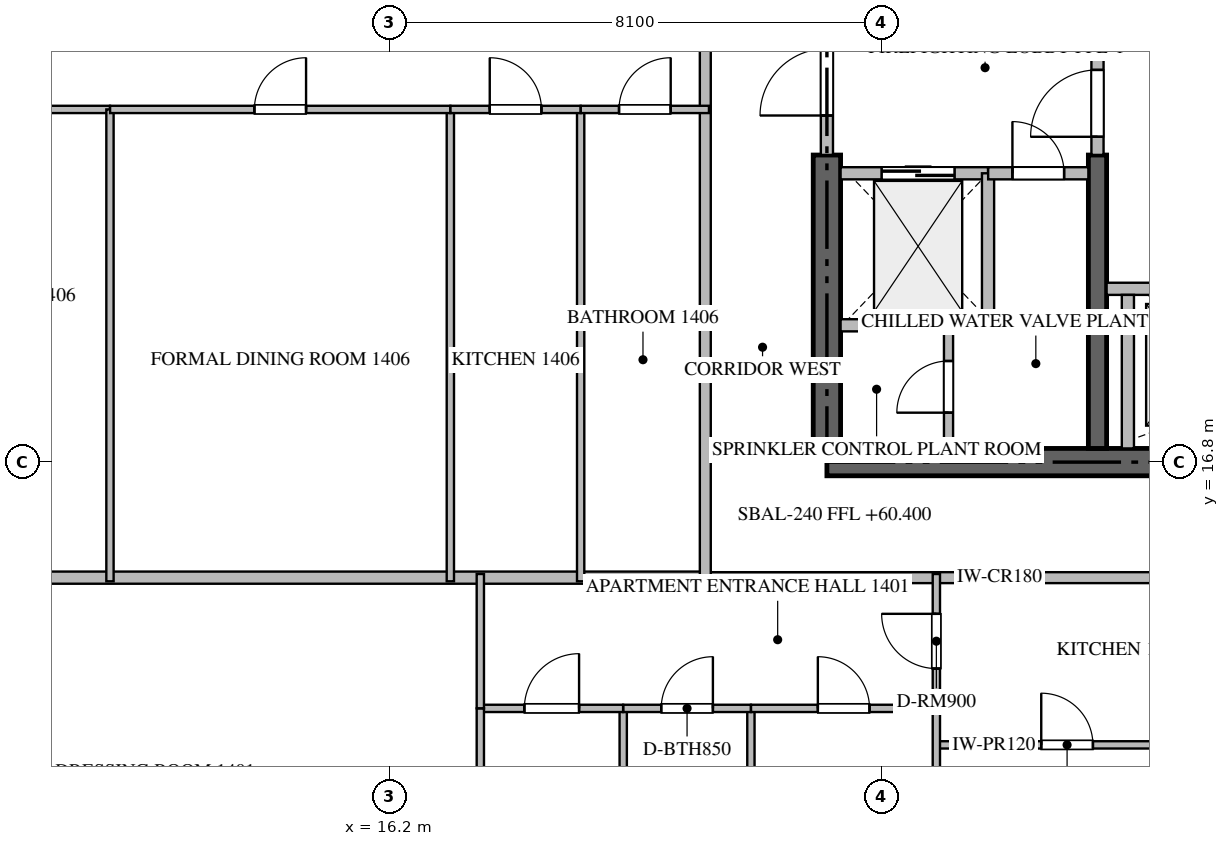
"""IFC4 building model, lengths in metres.
Left out: names, types, materials, properties, quantities, classifications, styles, units other than length and angle.
Written with IfcOpenShell. Run it as: python <this file> out.ifc"""

import sys

from ifc_helpers import new_model, si_unit, direction, frame, frame_2d, origin, place, context, subcontext, project, spatial, rectangle, extrude, source, transform, mapped, element, fill, save


model = new_model("IFC4")
c1 = context("Model", 3, precision=1e-05, world=origin(), true_north=direction((0.0, 1.0)))
c2 = subcontext(c1, "Body", "Model", "MODEL_VIEW")
j1 = project(units=[si_unit("LENGTHUNIT", "METRE"), si_unit("PLANEANGLEUNIT", "RADIAN")], contexts=[c1])
p1 = place(None, origin())
s1 = spatial("IfcSite", under=j1, at=p1, CompositionType="ELEMENT")
p2 = place(p1, origin())
s2 = spatial("IfcBuilding", under=s1, at=p2, CompositionType="ELEMENT")
p3 = place(p2, frame((0.0, 0.0, 60.45)))
s3 = spatial("IfcBuildingStorey", under=s2, at=p3, CompositionType="ELEMENT", Elevation=60.45)
p4 = place(p3, frame((23.4, 16.8, -0.26), z_axis=(0.0, 0.0, 1.0), x_axis=(1.0, 0.0, 0.0)))
e1 = element("IfcWall", 1, at=p4, inside=s3, PredefinedType="SHEAR", context=c2, shape_type="SweptSolid", body=[
    extrude(rectangle(XDim=18.0, YDim=0.45, at=frame_2d((9.0, 0.0))), origin(), (0.0, 0.0, 1.0), 3.748),
])
p5 = place(p3, frame((23.4, 17.025, -0.26), z_axis=(0.0, 0.0, 1.0), x_axis=(0.0, 1.0, 0.0)))
e2 = element("IfcWall", 2, at=p5, inside=s3, PredefinedType="SHEAR", context=c2, shape_type="SweptSolid", body=[
    extrude(rectangle(XDim=4.825, YDim=0.45, at=frame_2d((2.413, 0.0))), origin(), (0.0, 0.0, 1.0), 3.748),
])
p6 = place(p3, frame((27.85, 17.025, -0.26), z_axis=(0.0, 0.0, 1.0), x_axis=(0.0, 1.0, 0.0)))
e3 = element("IfcWall", 3, at=p6, inside=s3, PredefinedType="SHEAR", context=c2, shape_type="SweptSolid", body=[
    extrude(rectangle(XDim=4.825, YDim=0.3, at=frame_2d((2.413, 0.0))), origin(), (0.0, 0.0, 1.0), 3.748),
])
p7 = place(p3, frame((23.625, 21.55, 0.0), z_axis=(0.0, 0.0, 1.0), x_axis=(1.0, 0.0, 0.0)))
e4 = element("IfcWall", 4, at=p7, inside=s3, PredefinedType="STANDARD", context=c2, shape_type="SweptSolid", body=[
    extrude(rectangle(XDim=2.425, YDim=0.2, at=frame_2d((1.212, 0.0))), origin(), (0.0, 0.0, 1.0), 3.49),
])
p8 = place(p7, frame((0.675, 0.0, 0.0)))
e5 = element("IfcOpeningElement", 5, at=p8, cuts=e4, PredefinedType="OPENING", context=c2, shape_type="SweptSolid", body=[
    extrude(rectangle(XDim=1.2, YDim=2.2, at=frame_2d((0.6, 1.1))), frame((0.0, 0.11, 0.0), z_axis=(0.0, -1.0, 0.0), x_axis=(1.0, 0.0, 0.0)), (0.0, 0.0, 1.0), 0.22),
])
p9 = place(p3, frame((28.0, 19.65, 0.0), z_axis=(0.0, 0.0, 1.0), x_axis=(1.0, 0.0, 0.0)))
e6 = element("IfcWall", 6, at=p9, inside=s3, PredefinedType="STANDARD", context=c2, shape_type="SweptSolid", body=[
    extrude(rectangle(XDim=2.65, YDim=0.2, at=frame_2d((1.325, 0.0))), origin(), (0.0, 0.0, 1.0), 3.49),
])
p10 = place(p9, frame((0.9, 0.0, 0.0)))
e7 = element("IfcOpeningElement", 7, at=p10, cuts=e6, PredefinedType="OPENING", context=c2, shape_type="SweptSolid", body=[
    extrude(rectangle(XDim=1.1, YDim=2.2, at=frame_2d((0.55, 1.1))), frame((0.0, 0.11, 0.0), z_axis=(0.0, -1.0, 0.0), x_axis=(1.0, 0.0, 0.0)), (0.0, 0.0, 1.0), 0.22),
])
p11 = place(p3, frame((28.35, 17.025, 0.0), z_axis=(0.0, 0.0, 1.0), x_axis=(0.0, 1.0, 0.0)))
e8 = element("IfcWall", 8, at=p11, inside=s3, PredefinedType="STANDARD", context=c2, shape_type="SweptSolid", body=[
    extrude(rectangle(XDim=2.525, YDim=0.2, at=frame_2d((1.263, 0.0))), origin(), (0.0, 0.0, 1.0), 3.49),
])
p12 = place(p3, frame((26.05, 19.05, 0.0), z_axis=(0.0, 0.0, 1.0), x_axis=(0.0, 1.0, 0.0)))
e9 = element("IfcWall", 9, at=p12, inside=s3, PredefinedType="STANDARD", context=c2, shape_type="SweptSolid", body=[
    extrude(rectangle(XDim=2.5, YDim=0.2, at=frame_2d((1.25, 0.0))), origin(), (0.0, 0.0, 1.0), 3.49),
])
p13 = place(p3, frame((23.625, 19.05, 0.0), z_axis=(0.0, 0.0, 1.0), x_axis=(1.0, 0.0, 0.0)))
e10 = element("IfcWall", 10, at=p13, inside=s3, PredefinedType="STANDARD", context=c2, shape_type="SweptSolid", body=[
    extrude(rectangle(XDim=2.425, YDim=0.2, at=frame_2d((1.212, 0.0))), origin(), (0.0, 0.0, 1.0), 3.49),
])
p14 = place(p3, frame((26.052, 21.55, 0.0), z_axis=(0.0, 0.0, 1.0), x_axis=(1.0, 0.0, 0.0)))
e11 = element("IfcWall", 11, at=p14, inside=s3, PredefinedType="STANDARD", context=c2, shape_type="SweptSolid", body=[
    extrude(rectangle(XDim=1.648, YDim=0.2, at=frame_2d((0.824, 0.0))), origin(), (0.0, 0.0, 1.0), 3.49),
])
p15 = place(p14, frame((0.399, 0.0, 0.0)))
e12 = element("IfcOpeningElement", 12, at=p15, cuts=e11, PredefinedType="OPENING", context=c2, shape_type="SweptSolid", body=[
    extrude(rectangle(XDim=0.85, YDim=2.1, at=frame_2d((0.425, 1.05))), frame((0.0, 0.11, 0.0), z_axis=(0.0, -1.0, 0.0), x_axis=(1.0, 0.0, 0.0)), (0.0, 0.0, 1.0), 0.22),
])
p16 = place(p3, frame((23.4, 21.852, 0.0), z_axis=(0.0, 0.0, 1.0), x_axis=(0.0, 1.0, 0.0)))
e13 = element("IfcWall", 13, at=p16, inside=s3, PredefinedType="STANDARD", context=c2, shape_type="SweptSolid", body=[
    extrude(rectangle(XDim=2.396, YDim=0.2, at=frame_2d((1.198, 0.0))), origin(), (0.0, 0.0, 1.0), 3.49),
])
p17 = place(p16, frame((0.648, 0.0, 0.0)))
e14 = element("IfcOpeningElement", 14, at=p17, cuts=e13, PredefinedType="OPENING", context=c2, shape_type="SweptSolid", body=[
    extrude(rectangle(XDim=1.1, YDim=2.15, at=frame_2d((0.55, 1.075))), frame((0.0, 0.11, 0.0), z_axis=(0.0, -1.0, 0.0), x_axis=(1.0, 0.0, 0.0)), (0.0, 0.0, 1.0), 0.22),
])
p18 = place(p3, frame((27.85, 21.852, 0.0), z_axis=(0.0, 0.0, 1.0), x_axis=(0.0, 1.0, 0.0)))
e15 = element("IfcWall", 15, at=p18, inside=s3, PredefinedType="STANDARD", context=c2, shape_type="SweptSolid", body=[
    extrude(rectangle(XDim=1.696, YDim=0.2, at=frame_2d((0.848, 0.0))), origin(), (0.0, 0.0, 1.0), 3.49),
])
p19 = place(p18, frame((0.298, 0.0, 0.0)))
e16 = element("IfcOpeningElement", 16, at=p19, cuts=e15, PredefinedType="OPENING", context=c2, shape_type="SweptSolid", body=[
    extrude(rectangle(XDim=1.1, YDim=2.15, at=frame_2d((0.55, 1.075))), frame((0.0, 0.11, 0.0), z_axis=(0.0, -1.0, 0.0), x_axis=(1.0, 0.0, 0.0)), (0.0, 0.0, 1.0), 0.22),
])
p20 = place(p3, frame((25.4, 17.025, 0.0), z_axis=(0.0, 0.0, 1.0), x_axis=(0.0, 1.0, 0.0)))
e17 = element("IfcWall", 17, at=p20, inside=s3, PredefinedType="PARTITIONING", context=c2, shape_type="SweptSolid", body=[
    extrude(rectangle(XDim=2.025, YDim=0.15, at=frame_2d((1.013, 0.0))), origin(), (0.0, 0.0, 1.0), 3.49),
])
p21 = place(p20, frame((0.588, 0.0, 0.0)))
e18 = element("IfcOpeningElement", 18, at=p21, cuts=e17, PredefinedType="OPENING", context=c2, shape_type="SweptSolid", body=[
    extrude(rectangle(XDim=0.85, YDim=2.1, at=frame_2d((0.425, 1.05))), frame((0.0, 0.085, 0.0), z_axis=(0.0, -1.0, 0.0), x_axis=(1.0, 0.0, 0.0)), (0.0, 0.0, 1.0), 0.17),
])
p22 = place(p3, frame((6.082, 14.9, 0.0), z_axis=(0.0, 0.0, 1.0), x_axis=(1.0, 0.0, 0.0)))
e19 = element("IfcWall", 19, at=p22, inside=s3, PredefinedType="PARTITIONING", context=c2, shape_type="SweptSolid", body=[
    extrude(rectangle(XDim=15.318, YDim=0.2, at=frame_2d((7.659, 0.0))), origin(), (0.0, 0.0, 1.0), 3.49),
])
p23 = place(p3, frame((21.402, 14.9, 0.0), z_axis=(0.0, 0.0, 1.0), x_axis=(1.0, 0.0, 0.0)))
e20 = element("IfcWall", 20, at=p23, inside=s3, PredefinedType="PARTITIONING", context=c2, shape_type="SweptSolid", body=[
    extrude(rectangle(XDim=21.996, YDim=0.18, at=frame_2d((10.998, 0.0))), origin(), (0.0, 0.0, 1.0), 3.49),
])
p24 = place(p23, frame((9.742, 0.0, 0.0)))
e21 = element("IfcOpeningElement", 21, at=p24, cuts=e20, PredefinedType="OPENING", context=c2, shape_type="SweptSolid", body=[
    extrude(rectangle(XDim=1.0, YDim=2.15, at=frame_2d((0.5, 1.075))), frame((0.0, 0.1, 0.0), z_axis=(0.0, -1.0, 0.0), x_axis=(1.0, 0.0, 0.0)), (0.0, 0.0, 1.0), 0.2),
])
p25 = place(p23, frame((14.781, 0.0, 0.0)))
e22 = element("IfcOpeningElement", 22, at=p25, cuts=e20, PredefinedType="OPENING", context=c2, shape_type="SweptSolid", body=[
    extrude(rectangle(XDim=1.0, YDim=2.15, at=frame_2d((0.5, 1.075))), frame((0.0, 0.1, 0.0), z_axis=(0.0, -1.0, 0.0), x_axis=(1.0, 0.0, 0.0)), (0.0, 0.0, 1.0), 0.2),
])
p26 = place(p3, frame((21.4, 14.9, 0.0), z_axis=(0.0, 0.0, 1.0), x_axis=(0.0, 1.0, 0.0)))
e23 = element("IfcWall", 23, at=p26, inside=s3, PredefinedType="PARTITIONING", context=c2, shape_type="SweptSolid", body=[
    extrude(rectangle(XDim=20.6, YDim=0.18, at=frame_2d((10.3, 0.0))), origin(), (0.0, 0.0, 1.0), 3.49),
])
p27 = place(p26, frame((8.996, 0.0, 0.0)))
e24 = element("IfcOpeningElement", 24, at=p27, cuts=e23, PredefinedType="OPENING", context=c2, shape_type="SweptSolid", body=[
    extrude(rectangle(XDim=1.0, YDim=2.15, at=frame_2d((0.5, 1.075))), frame((0.0, 0.1, 0.0), z_axis=(0.0, -1.0, 0.0), x_axis=(1.0, 0.0, 0.0)), (0.0, 0.0, 1.0), 0.2),
])
p28 = place(p26, frame((13.191, 0.0, 0.0)))
e25 = element("IfcOpeningElement", 25, at=p28, cuts=e23, PredefinedType="OPENING", context=c2, shape_type="SweptSolid", body=[
    extrude(rectangle(XDim=1.0, YDim=2.15, at=frame_2d((0.5, 1.075))), frame((0.0, 0.1, 0.0), z_axis=(0.0, -1.0, 0.0), x_axis=(1.0, 0.0, 0.0)), (0.0, 0.0, 1.0), 0.2),
])
p29 = place(p3, frame((25.2, 12.15, 0.0), z_axis=(0.0, 0.0, 1.0), x_axis=(1.0, 0.0, 0.0)))
e26 = element("IfcWall", 26, at=p29, inside=s3, PredefinedType="PARTITIONING", context=c2, shape_type="SweptSolid", body=[
    extrude(rectangle(XDim=4.3, YDim=0.12, at=frame_2d((2.15, 0.0))), origin(), (0.0, 0.0, 1.0), 3.49),
])
p30 = place(p29, frame((1.725, 0.0, 0.0)))
e27 = element("IfcOpeningElement", 27, at=p30, cuts=e26, PredefinedType="OPENING", context=c2, shape_type="SweptSolid", body=[
    extrude(rectangle(XDim=0.85, YDim=2.1, at=frame_2d((0.425, 1.05))), frame((0.0, 0.07, 0.0), z_axis=(0.0, -1.0, 0.0), x_axis=(1.0, 0.0, 0.0)), (0.0, 0.0, 1.0), 0.14),
])
p31 = place(p3, frame((25.2, 12.75, 0.0), z_axis=(0.0, 0.0, 1.0), x_axis=(0.0, 1.0, 0.0)))
e28 = element("IfcWall", 28, at=p31, inside=s3, PredefinedType="PARTITIONING", context=c2, shape_type="SweptSolid", body=[
    extrude(rectangle(XDim=2.21, YDim=0.12, at=frame_2d((1.105, 0.0))), origin(), (0.0, 0.0, 1.0), 3.49),
])
p32 = place(p31, frame((0.655, 0.0, 0.0)))
e29 = element("IfcOpeningElement", 29, at=p32, cuts=e28, PredefinedType="OPENING", context=c2, shape_type="SweptSolid", body=[
    extrude(rectangle(XDim=0.9, YDim=2.1, at=frame_2d((0.45, 1.05))), frame((0.0, 0.07, 0.0), z_axis=(0.0, -1.0, 0.0), x_axis=(1.0, 0.0, 0.0)), (0.0, 0.0, 1.0), 0.14),
])
p33 = place(p3, frame((25.2, 6.862, 0.0), z_axis=(0.0, 0.0, 1.0), x_axis=(0.0, 1.0, 0.0)))
e30 = element("IfcWall", 30, at=p33, inside=s3, PredefinedType="PARTITIONING", context=c2, shape_type="SweptSolid", body=[
    extrude(rectangle(XDim=5.886, YDim=0.12, at=frame_2d((2.943, 0.0))), origin(), (0.0, 0.0, 1.0), 3.49),
])
p34 = place(p3, frame((20.05, 0.295, 0.0), z_axis=(0.0, 0.0, 1.0), x_axis=(0.0, 1.0, 0.0)))
e31 = element("IfcWall", 31, at=p34, inside=s3, PredefinedType="PARTITIONING", context=c2, shape_type="SweptSolid", body=[
    extrude(rectangle(XDim=12.455, YDim=0.12, at=frame_2d((6.228, 0.0))), origin(), (0.0, 0.0, 1.0), 3.49),
])
p35 = place(p3, frame((22.15, 6.86, 0.0), z_axis=(0.0, 0.0, 1.0), x_axis=(0.0, 1.0, 0.0)))
e32 = element("IfcWall", 32, at=p35, inside=s3, PredefinedType="PARTITIONING", context=c2, shape_type="SweptSolid", body=[
    extrude(rectangle(XDim=5.89, YDim=0.12, at=frame_2d((2.945, 0.0))), origin(), (0.0, 0.0, 1.0), 3.49),
])
p36 = place(p3, frame((20.05, 12.75, 0.0), z_axis=(0.0, 0.0, 1.0), x_axis=(1.0, 0.0, 0.0)))
e33 = element("IfcWall", 33, at=p36, inside=s3, PredefinedType="PARTITIONING", context=c2, shape_type="SweptSolid", body=[
    extrude(rectangle(XDim=2.1, YDim=0.12, at=frame_2d((1.05, 0.0))), origin(), (0.0, 0.0, 1.0), 3.49),
])
p37 = place(p36, frame((0.625, 0.0, 0.0)))
e34 = element("IfcOpeningElement", 34, at=p37, cuts=e33, PredefinedType="OPENING", context=c2, shape_type="SweptSolid", body=[
    extrude(rectangle(XDim=0.85, YDim=2.1, at=frame_2d((0.425, 1.05))), frame((0.0, 0.07, 0.0), z_axis=(0.0, -1.0, 0.0), x_axis=(1.0, 0.0, 0.0)), (0.0, 0.0, 1.0), 0.14),
])
p38 = place(p3, frame((22.152, 12.75, 0.0), z_axis=(0.0, 0.0, 1.0), x_axis=(1.0, 0.0, 0.0)))
e35 = element("IfcWall", 35, at=p38, inside=s3, PredefinedType="PARTITIONING", context=c2, shape_type="SweptSolid", body=[
    extrude(rectangle(XDim=3.048, YDim=0.12, at=frame_2d((1.524, 0.0))), origin(), (0.0, 0.0, 1.0), 3.49),
])
p39 = place(p38, frame((1.099, 0.0, 0.0)))
e36 = element("IfcOpeningElement", 36, at=p39, cuts=e35, PredefinedType="OPENING", context=c2, shape_type="SweptSolid", body=[
    extrude(rectangle(XDim=0.85, YDim=2.1, at=frame_2d((0.425, 1.05))), frame((0.0, 0.07, 0.0), z_axis=(0.0, -1.0, 0.0), x_axis=(1.0, 0.0, 0.0)), (0.0, 0.0, 1.0), 0.14),
])
p40 = place(p3, frame((17.7, 12.75, 0.0), z_axis=(0.0, 0.0, 1.0), x_axis=(1.0, 0.0, 0.0)))
e37 = element("IfcWall", 37, at=p40, inside=s3, PredefinedType="PARTITIONING", context=c2, shape_type="SweptSolid", body=[
    extrude(rectangle(XDim=2.348, YDim=0.12, at=frame_2d((1.174, 0.0))), origin(), (0.0, 0.0, 1.0), 3.49),
])
p41 = place(p40, frame((0.724, 0.0, 0.0)))
e38 = element("IfcOpeningElement", 38, at=p41, cuts=e37, PredefinedType="OPENING", context=c2, shape_type="SweptSolid", body=[
    extrude(rectangle(XDim=0.9, YDim=2.1, at=frame_2d((0.45, 1.05))), frame((0.0, 0.07, 0.0), z_axis=(0.0, -1.0, 0.0), x_axis=(1.0, 0.0, 0.0)), (0.0, 0.0, 1.0), 0.14),
])
p42 = place(p3, frame((17.7, 9.428, 0.0), z_axis=(0.0, 0.0, 1.0), x_axis=(0.0, 1.0, 0.0)))
e39 = element("IfcWall", 39, at=p42, inside=s3, PredefinedType="PARTITIONING", context=c2, shape_type="SweptSolid", body=[
    extrude(rectangle(XDim=3.322, YDim=0.12, at=frame_2d((1.661, 0.0))), origin(), (0.0, 0.0, 1.0), 3.49),
])
p43 = place(p42, frame((1.236, 0.0, 0.0)))
e40 = element("IfcOpeningElement", 40, at=p43, cuts=e39, PredefinedType="OPENING", context=c2, shape_type="SweptSolid", body=[
    extrude(rectangle(XDim=0.85, YDim=2.1, at=frame_2d((0.425, 1.05))), frame((0.0, 0.07, 0.0), z_axis=(0.0, -1.0, 0.0), x_axis=(1.0, 0.0, 0.0)), (0.0, 0.0, 1.0), 0.14),
])
p44 = place(p3, frame((17.7, 12.752, 0.0), z_axis=(0.0, 0.0, 1.0), x_axis=(0.0, 1.0, 0.0)))
e41 = element("IfcWall", 41, at=p44, inside=s3, PredefinedType="PARTITIONING", context=c2, shape_type="SweptSolid", body=[
    extrude(rectangle(XDim=2.208, YDim=0.12, at=frame_2d((1.104, 0.0))), origin(), (0.0, 0.0, 1.0), 3.49),
])
p45 = place(p3, frame((6.095, 22.6, 0.0), z_axis=(0.0, 0.0, 1.0), x_axis=(1.0, 0.0, 0.0)))
e42 = element("IfcWall", 42, at=p45, inside=s3, PredefinedType="PARTITIONING", context=c2, shape_type="SweptSolid", body=[
    extrude(rectangle(XDim=5.514, YDim=0.12, at=frame_2d((2.757, 0.0))), origin(), (0.0, 0.0, 1.0), 3.49),
])
p46 = place(p45, frame((2.538, 0.0, 0.0)))
e43 = element("IfcOpeningElement", 43, at=p46, cuts=e42, PredefinedType="OPENING", context=c2, shape_type="SweptSolid", body=[
    extrude(rectangle(XDim=0.9, YDim=2.1, at=frame_2d((0.45, 1.05))), frame((0.0, 0.07, 0.0), z_axis=(0.0, -1.0, 0.0), x_axis=(1.0, 0.0, 0.0)), (0.0, 0.0, 1.0), 0.14),
])
for number, where, z_axis, x_axis in (
    (44, (11.609, 14.84, 0.0), (0.0, 0.0, 1.0), (0.0, 1.0, 0.0)),
    (45, (17.207, 14.84, 0.0), (0.0, 0.0, 1.0), (0.0, 1.0, 0.0)),
    (46, (19.35, 14.84, 0.0), (0.0, 0.0, 1.0), (0.0, 1.0, 0.0)),
):
    element("IfcWall", number, at=place(p3, frame(where, z_axis=z_axis, x_axis=x_axis)), inside=s3, PredefinedType="PARTITIONING", context=c2, shape_type="SweptSolid", body=[
        extrude(rectangle(XDim=7.76, YDim=0.12, at=frame_2d((3.88, 0.0))), origin(), (0.0, 0.0, 1.0), 3.49),
    ])
p47 = place(p3, frame((11.611, 22.6, 0.0), z_axis=(0.0, 0.0, 1.0), x_axis=(1.0, 0.0, 0.0)))
e47 = element("IfcWall", 47, at=p47, inside=s3, PredefinedType="PARTITIONING", context=c2, shape_type="SweptSolid", body=[
    extrude(rectangle(XDim=5.596, YDim=0.12, at=frame_2d((2.798, 0.0))), origin(), (0.0, 0.0, 1.0), 3.49),
])
p48 = place(p47, frame((2.373, 0.0, 0.0)))
e48 = element("IfcOpeningElement", 48, at=p48, cuts=e47, PredefinedType="OPENING", context=c2, shape_type="SweptSolid", body=[
    extrude(rectangle(XDim=0.85, YDim=2.1, at=frame_2d((0.425, 1.05))), frame((0.0, 0.07, 0.0), z_axis=(0.0, -1.0, 0.0), x_axis=(1.0, 0.0, 0.0)), (0.0, 0.0, 1.0), 0.14),
])
p49 = place(p3, frame((17.209, 22.6, 0.0), z_axis=(0.0, 0.0, 1.0), x_axis=(1.0, 0.0, 0.0)))
e49 = element("IfcWall", 49, at=p49, inside=s3, PredefinedType="PARTITIONING", context=c2, shape_type="SweptSolid", body=[
    extrude(rectangle(XDim=2.141, YDim=0.12, at=frame_2d((1.071, 0.0))), origin(), (0.0, 0.0, 1.0), 3.49),
])
p50 = place(p49, frame((0.646, 0.0, 0.0)))
e50 = element("IfcOpeningElement", 50, at=p50, cuts=e49, PredefinedType="OPENING", context=c2, shape_type="SweptSolid", body=[
    extrude(rectangle(XDim=0.85, YDim=2.1, at=frame_2d((0.425, 1.05))), frame((0.0, 0.07, 0.0), z_axis=(0.0, -1.0, 0.0), x_axis=(1.0, 0.0, 0.0)), (0.0, 0.0, 1.0), 0.14),
])
p51 = place(p3, frame((19.352, 22.6, 0.0), z_axis=(0.0, 0.0, 1.0), x_axis=(1.0, 0.0, 0.0)))
e51 = element("IfcWall", 51, at=p51, inside=s3, PredefinedType="PARTITIONING", context=c2, shape_type="SweptSolid", body=[
    extrude(rectangle(XDim=2.108, YDim=0.12, at=frame_2d((1.054, 0.0))), origin(), (0.0, 0.0, 1.0), 3.49),
])
p52 = place(p51, frame((0.629, 0.0, 0.0)))
e52 = element("IfcOpeningElement", 52, at=p52, cuts=e51, PredefinedType="OPENING", context=c2, shape_type="SweptSolid", body=[
    extrude(rectangle(XDim=0.85, YDim=2.1, at=frame_2d((0.425, 1.05))), frame((0.0, 0.07, 0.0), z_axis=(0.0, -1.0, 0.0), x_axis=(1.0, 0.0, 0.0)), (0.0, 0.0, 1.0), 0.14),
])
m1 = source(origin(), c2, "Body", "SweptSolid", [
    extrude(rectangle(XDim=1.2, YDim=2.2, at=frame_2d((0.6, 1.1))), frame((0.0, 0.025, 0.0), z_axis=(0.0, -1.0, 0.0), x_axis=(1.0, 0.0, 0.0)), (0.0, 0.0, 1.0), 0.05),
])
p53 = place(p8, origin())
e53 = element("IfcDoor", 53, at=p53, inside=s3, OperationType="DOUBLE_DOOR_SLIDING", PredefinedType="DOOR", context=c2, shape_type="MappedRepresentation", body=[
    mapped(m1, transform((0.0, 0.0, 0.0), scale=1.0)),
])
fill(e5, e53)
m2 = source(origin(), c2, "Body", "SweptSolid", [
    extrude(rectangle(XDim=0.85, YDim=2.1, at=frame_2d((0.425, 1.05))), frame((0.0, 0.025, 0.0), z_axis=(0.0, -1.0, 0.0), x_axis=(1.0, 0.0, 0.0)), (0.0, 0.0, 1.0), 0.05),
])
p54 = place(p15, origin())
e54 = element("IfcDoor", 54, at=p54, inside=s3, OperationType="SINGLE_SWING_LEFT", PredefinedType="DOOR", context=c2, shape_type="MappedRepresentation", body=[
    mapped(m2, transform((0.0, 0.0, 0.0), scale=1.0)),
])
fill(e12, e54)
m3 = source(origin(), c2, "Body", "SweptSolid", [
    extrude(rectangle(XDim=1.1, YDim=2.15, at=frame_2d((0.55, 1.075))), frame((0.0, 0.025, 0.0), z_axis=(0.0, -1.0, 0.0), x_axis=(1.0, 0.0, 0.0)), (0.0, 0.0, 1.0), 0.05),
])
p55 = place(p17, origin())
e55 = element("IfcDoor", 55, at=p55, inside=s3, OperationType="SINGLE_SWING_LEFT", PredefinedType="DOOR", context=c2, shape_type="MappedRepresentation", body=[
    mapped(m3, transform((0.0, 0.0, 0.0), scale=1.0)),
])
fill(e14, e55)
p56 = place(p19, origin())
e56 = element("IfcDoor", 56, at=p56, inside=s3, OperationType="SINGLE_SWING_LEFT", PredefinedType="DOOR", context=c2, shape_type="MappedRepresentation", body=[
    mapped(m3, transform((0.0, 0.0, 0.0), scale=1.0)),
])
fill(e16, e56)
p57 = place(p21, origin())
e57 = element("IfcDoor", 57, at=p57, inside=s3, OperationType="SINGLE_SWING_LEFT", PredefinedType="DOOR", context=c2, shape_type="MappedRepresentation", body=[
    mapped(m2, transform((0.0, 0.0, 0.0), scale=1.0)),
])
fill(e18, e57)
p58 = place(p30, origin())
e58 = element("IfcDoor", 58, at=p58, inside=s3, OperationType="SINGLE_SWING_LEFT", PredefinedType="DOOR", context=c2, shape_type="MappedRepresentation", body=[
    mapped(m2, transform((0.0, 0.0, 0.0), scale=1.0)),
])
fill(e27, e58)
m4 = source(origin(), c2, "Body", "SweptSolid", [
    extrude(rectangle(XDim=0.9, YDim=2.1, at=frame_2d((0.45, 1.05))), frame((0.0, 0.025, 0.0), z_axis=(0.0, -1.0, 0.0), x_axis=(1.0, 0.0, 0.0)), (0.0, 0.0, 1.0), 0.05),
])
p59 = place(p32, origin())
e59 = element("IfcDoor", 59, at=p59, inside=s3, OperationType="SINGLE_SWING_RIGHT", PredefinedType="DOOR", context=c2, shape_type="MappedRepresentation", body=[
    mapped(m4, transform((0.0, 0.0, 0.0), scale=1.0)),
])
fill(e29, e59)
p60 = place(p37, origin())
e60 = element("IfcDoor", 60, at=p60, inside=s3, OperationType="SINGLE_SWING_RIGHT", PredefinedType="DOOR", context=c2, shape_type="MappedRepresentation", body=[
    mapped(m2, transform((0.0, 0.0, 0.0), scale=1.0)),
])
fill(e34, e60)
p61 = place(p39, origin())
e61 = element("IfcDoor", 61, at=p61, inside=s3, OperationType="SINGLE_SWING_LEFT", PredefinedType="DOOR", context=c2, shape_type="MappedRepresentation", body=[
    mapped(m2, transform((0.0, 0.0, 0.0), scale=1.0)),
])
fill(e36, e61)
p62 = place(p41, origin())
e62 = element("IfcDoor", 62, at=p62, inside=s3, OperationType="SINGLE_SWING_RIGHT", PredefinedType="DOOR", context=c2, shape_type="MappedRepresentation", body=[
    mapped(m4, transform((0.0, 0.0, 0.0), scale=1.0)),
])
fill(e38, e62)
p63 = place(p48, origin())
e63 = element("IfcDoor", 63, at=p63, inside=s3, OperationType="SINGLE_SWING_RIGHT", PredefinedType="DOOR", context=c2, shape_type="MappedRepresentation", body=[
    mapped(m2, transform((0.0, 0.0, 0.0), scale=1.0)),
])
fill(e48, e63)
p64 = place(p50, origin())
e64 = element("IfcDoor", 64, at=p64, inside=s3, OperationType="SINGLE_SWING_LEFT", PredefinedType="DOOR", context=c2, shape_type="MappedRepresentation", body=[
    mapped(m2, transform((0.0, 0.0, 0.0), scale=1.0)),
])
fill(e50, e64)
p65 = place(p52, origin())
e65 = element("IfcDoor", 65, at=p65, inside=s3, OperationType="SINGLE_SWING_RIGHT", PredefinedType="DOOR", context=c2, shape_type="MappedRepresentation", body=[
    mapped(m2, transform((0.0, 0.0, 0.0), scale=1.0)),
])
fill(e52, e65)
save(model, sys.argv[1])
